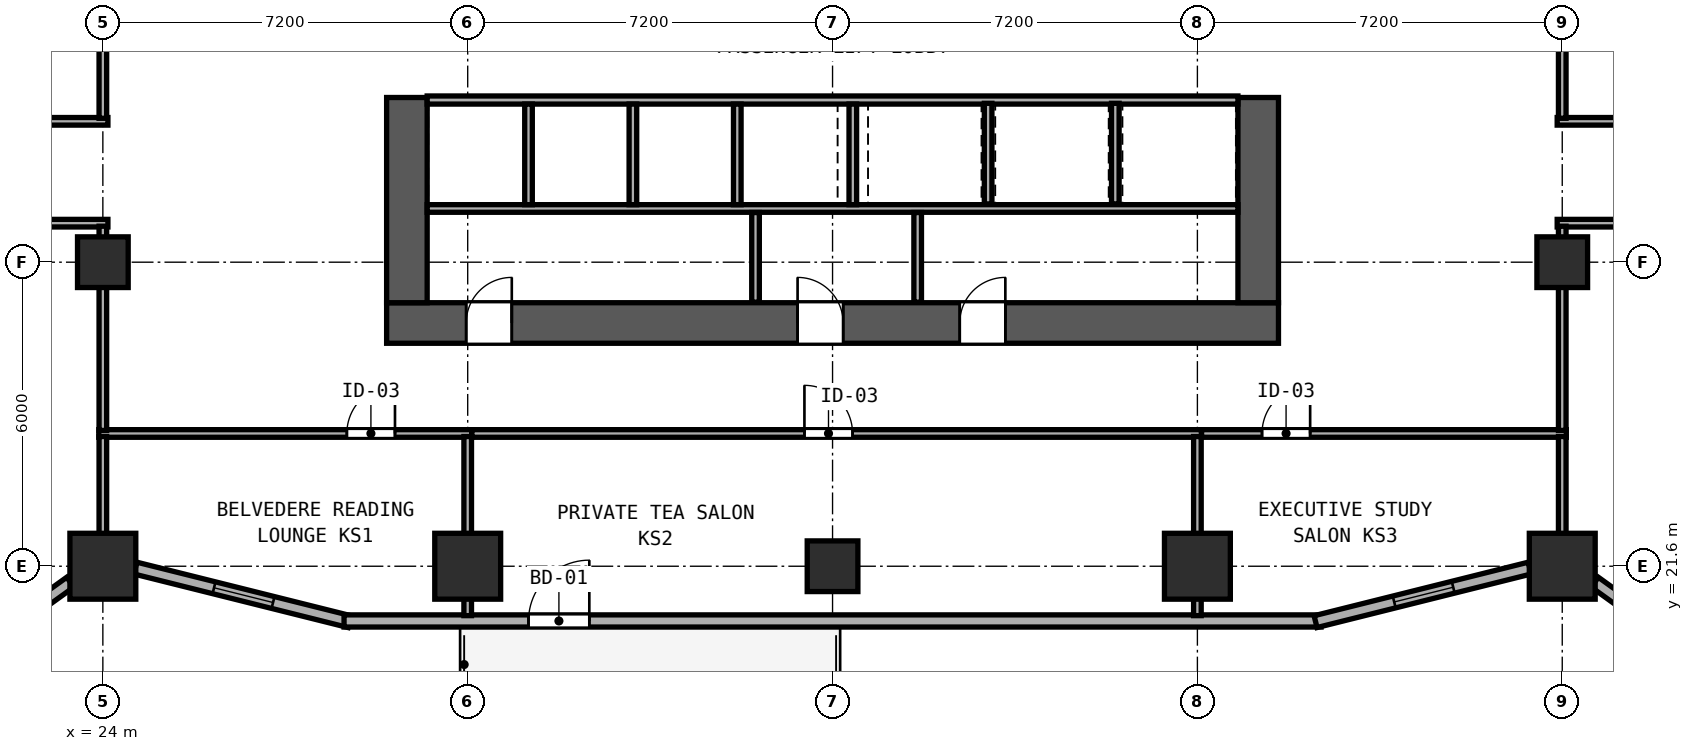
"""IFC4 building model, lengths in metres.
Left out: names, types, materials, properties, quantities, classifications, styles, units other than length and angle.
Written with IfcOpenShell. Run it as: python <this file> out.ifc"""

import sys

from ifc_helpers import new_model, si_unit, direction, frame, frame_2d, origin, origin_2d, place, context, subcontext, project, spatial, rectangle, hollow_rectangle, extrude, element, fill, save


model = new_model("IFC4")
c1 = context("Model", 3, precision=1e-05, world=origin(), true_north=direction((0.0, 1.0)))
c2 = subcontext(c1, "Body", "Model", "MODEL_VIEW")
j1 = project(units=[si_unit("LENGTHUNIT", "METRE"), si_unit("PLANEANGLEUNIT", "RADIAN")], contexts=[c1])
p1 = place(None, origin())
s1 = spatial("IfcSite", under=j1, at=p1, CompositionType="ELEMENT")
p2 = place(p1, origin())
s2 = spatial("IfcBuilding", under=s1, at=p2, CompositionType="ELEMENT")
p3 = place(p2, frame((0.0, 0.0, 31.6)))
s3 = spatial("IfcBuildingStorey", under=s2, at=p3, CompositionType="ELEMENT", Elevation=31.6)
p4 = place(p3, frame((29.6, 26.4, 0.0), z_axis=(0.0, 0.0, 1.0), x_axis=(1.0, 0.0, 0.0)))
e1 = element("IfcWall", 1, at=p4, inside=s3, PredefinedType="SHEAR", context=c2, shape_type="SweptSolid", body=[
    extrude(rectangle(XDim=17.6, YDim=0.8, at=frame_2d((8.8, 0.0))), origin(), (0.0, 0.0, 1.0), 3.6),
])
p5 = place(p4, frame((2.47, 0.0, 0.0), z_axis=(0.0, 0.0, 1.0), x_axis=(-1.0, 0.0, 0.0)))
e2 = element("IfcOpeningElement", 2, at=p5, cuts=e1, PredefinedType="OPENING", context=c2, shape_type="SweptSolid", body=[
    extrude(rectangle(XDim=0.9, YDim=2.1, at=frame_2d((0.45, 1.05))), frame((0.0, 0.41, 0.0), z_axis=(0.0, -1.0, 0.0), x_axis=(1.0, 0.0, 0.0)), (0.0, 0.0, 1.0), 0.82),
])
p6 = place(p4, frame((9.01, 0.0, 0.0), z_axis=(0.0, 0.0, 1.0), x_axis=(-1.0, 0.0, 0.0)))
e3 = element("IfcOpeningElement", 3, at=p6, cuts=e1, PredefinedType="OPENING", context=c2, shape_type="SweptSolid", body=[
    extrude(rectangle(XDim=0.9, YDim=2.1, at=frame_2d((0.45, 1.05))), frame((0.0, 0.41, 0.0), z_axis=(0.0, -1.0, 0.0), x_axis=(1.0, 0.0, 0.0)), (0.0, 0.0, 1.0), 0.82),
])
p7 = place(p4, frame((12.21, 0.0, 0.0), z_axis=(0.0, 0.0, 1.0), x_axis=(-1.0, 0.0, 0.0)))
e4 = element("IfcOpeningElement", 4, at=p7, cuts=e1, PredefinedType="OPENING", context=c2, shape_type="SweptSolid", body=[
    extrude(rectangle(XDim=0.9, YDim=2.1, at=frame_2d((0.45, 1.05))), frame((0.0, 0.41, 0.0), z_axis=(0.0, -1.0, 0.0), x_axis=(1.0, 0.0, 0.0)), (0.0, 0.0, 1.0), 0.82),
])
for number, where, z_axis, x_axis in (
    (5, (30.0, 26.8, 0.0), (0.0, 0.0, 1.0), (0.0, 1.0, 0.0)),
    (6, (46.8, 26.8, 0.0), (0.0, 0.0, 1.0), (0.0, 1.0, 0.0)),
):
    element("IfcWall", number, at=place(p3, frame(where, z_axis=z_axis, x_axis=x_axis)), inside=s3, PredefinedType="SHEAR", context=c2, shape_type="SweptSolid", body=[
        extrude(rectangle(XDim=4.05, YDim=0.8, at=frame_2d((2.025, 0.0))), origin(), (0.0, 0.0, 1.0), 3.6),
    ])
for number, where, z_axis, x_axis in (
    (7, (24.0, 21.6, 0.0), (0.0, 0.0, 1.0), (1.0, 0.0, 0.0)),
    (8, (52.8, 21.6, 0.0), (0.0, 0.0, 1.0), (1.0, 0.0, 0.0)),
    (9, (31.2, 21.6, 0.0), (0.0, 0.0, 1.0), (1.0, 0.0, 0.0)),
    (10, (45.6, 21.6, 0.0), (0.0, 0.0, 1.0), (1.0, 0.0, 0.0)),
):
    element("IfcColumn", number, at=place(p3, frame(where, z_axis=z_axis, x_axis=x_axis)), inside=s3, PredefinedType="COLUMN", context=c2, shape_type="SweptSolid", body=[
        extrude(hollow_rectangle(XDim=1.3, YDim=1.3, WallThickness=0.048, at=origin_2d()), origin(), (0.0, 0.0, 1.0), 3.8),
    ])
for number, where, z_axis, x_axis in (
    (11, (24.0, 27.6, 0.0), (0.0, 0.0, 1.0), (1.0, 0.0, 0.0)),
    (12, (52.8, 27.6, 0.0), (0.0, 0.0, 1.0), (1.0, 0.0, 0.0)),
    (13, (38.4, 21.6, 0.0), (0.0, 0.0, 1.0), (1.0, 0.0, 0.0)),
):
    element("IfcColumn", number, at=place(p3, frame(where, z_axis=z_axis, x_axis=x_axis)), inside=s3, PredefinedType="COLUMN", context=c2, shape_type="SweptSolid", body=[
        extrude(hollow_rectangle(XDim=1.0, YDim=1.0, WallThickness=0.038, at=origin_2d()), origin(), (0.0, 0.0, 1.0), 3.8),
    ])
p8 = place(p3, frame((14.075, 14.602, 0.0), z_axis=(0.0, 0.0, 1.0), x_axis=(0.811535555989, 0.584303038984, 0.0)))
e14 = element("IfcWall", 14, at=p8, inside=s3, PredefinedType="SOLIDWALL", context=c2, shape_type="SweptSolid", body=[
    extrude(rectangle(XDim=11.438, YDim=0.24, at=frame_2d((5.719, 0.0))), origin(), (0.0, 0.0, 1.0), 3.097),
])
p9 = place(p8, frame((1.6, 0.0, 0.85)))
e15 = element("IfcOpeningElement", 15, at=p9, cuts=e14, PredefinedType="OPENING", context=c2, shape_type="SweptSolid", body=[
    extrude(rectangle(XDim=1.2, YDim=1.85, at=frame_2d((0.6, 0.925))), frame((0.0, 0.13, 0.0), z_axis=(0.0, -1.0, 0.0), x_axis=(1.0, 0.0, 0.0)), (0.0, 0.0, 1.0), 0.26),
])
p10 = place(p8, frame((7.0, 0.0, 0.85)))
e16 = element("IfcOpeningElement", 16, at=p10, cuts=e14, PredefinedType="OPENING", context=c2, shape_type="SweptSolid", body=[
    extrude(rectangle(XDim=1.2, YDim=1.85, at=frame_2d((0.6, 0.925))), frame((0.0, 0.13, 0.0), z_axis=(0.0, -1.0, 0.0), x_axis=(1.0, 0.0, 0.0)), (0.0, 0.0, 1.0), 0.26),
])
p11 = place(p3, frame((24.642, 21.563, 0.0), z_axis=(0.0, 0.0, 1.0), x_axis=(0.970135906278, -0.242561998982, 0.0)))
e17 = element("IfcWall", 17, at=p11, inside=s3, PredefinedType="SOLIDWALL", context=c2, shape_type="SweptSolid", body=[
    extrude(rectangle(XDim=4.356, YDim=0.24, at=frame_2d((2.178, 0.0))), origin(), (0.0, 0.0, 1.0), 3.097),
])
p12 = place(p11, frame((1.6, 0.0, 0.85)))
e18 = element("IfcOpeningElement", 18, at=p12, cuts=e17, PredefinedType="OPENING", context=c2, shape_type="SweptSolid", body=[
    extrude(rectangle(XDim=1.2, YDim=1.85, at=frame_2d((0.6, 0.925))), frame((0.0, 0.13, 0.0), z_axis=(0.0, -1.0, 0.0), x_axis=(1.0, 0.0, 0.0)), (0.0, 0.0, 1.0), 0.26),
])
p13 = place(p3, frame((28.76, 20.52, 0.0), z_axis=(0.0, 0.0, 1.0), x_axis=(1.0, 0.0, 0.0)))
e19 = element("IfcWall", 19, at=p13, inside=s3, PredefinedType="SOLIDWALL", context=c2, shape_type="SweptSolid", body=[
    extrude(rectangle(XDim=19.281, YDim=0.24, at=frame_2d((9.64, 0.0))), origin(), (0.0, 0.0, 1.0), 3.6),
])
p14 = place(p13, frame((4.84, 0.0, 0.0), z_axis=(0.0, 0.0, 1.0), x_axis=(-1.0, 0.0, 0.0)))
e20 = element("IfcOpeningElement", 20, at=p14, cuts=e19, PredefinedType="OPENING", context=c2, shape_type="SweptSolid", body=[
    extrude(rectangle(XDim=1.2, YDim=2.15, at=frame_2d((0.6, 1.075))), frame((0.0, 0.13, 0.0), z_axis=(0.0, -1.0, 0.0), x_axis=(1.0, 0.0, 0.0)), (0.0, 0.0, 1.0), 0.26),
])
p15 = place(p3, frame((47.932, 20.507, 0.0), z_axis=(0.0, 0.0, 1.0), x_axis=(0.970135906278, 0.242561998982, 0.0)))
e21 = element("IfcWall", 21, at=p15, inside=s3, PredefinedType="SOLIDWALL", context=c2, shape_type="SweptSolid", body=[
    extrude(rectangle(XDim=4.356, YDim=0.24, at=frame_2d((2.178, 0.0))), origin(), (0.0, 0.0, 1.0), 3.097),
])
p16 = place(p15, frame((1.6, 0.0, 0.85)))
e22 = element("IfcOpeningElement", 22, at=p16, cuts=e21, PredefinedType="OPENING", context=c2, shape_type="SweptSolid", body=[
    extrude(rectangle(XDim=1.2, YDim=1.85, at=frame_2d((0.6, 0.925))), frame((0.0, 0.13, 0.0), z_axis=(0.0, -1.0, 0.0), x_axis=(1.0, 0.0, 0.0)), (0.0, 0.0, 1.0), 0.26),
])
p17 = place(p3, frame((53.442, 21.286, 0.0), z_axis=(0.0, 0.0, 1.0), x_axis=(0.811542842993, -0.584292917967, 0.0)))
e23 = element("IfcWall", 23, at=p17, inside=s3, PredefinedType="SOLIDWALL", context=c2, shape_type="SweptSolid", body=[
    extrude(rectangle(XDim=11.438, YDim=0.24, at=frame_2d((5.719, 0.0))), origin(), (0.0, 0.0, 1.0), 3.097),
])
p18 = place(p17, frame((1.6, 0.0, 0.85)))
e24 = element("IfcOpeningElement", 24, at=p18, cuts=e23, PredefinedType="OPENING", context=c2, shape_type="SweptSolid", body=[
    extrude(rectangle(XDim=1.2, YDim=1.85, at=frame_2d((0.6, 0.925))), frame((0.0, 0.13, 0.0), z_axis=(0.0, -1.0, 0.0), x_axis=(1.0, 0.0, 0.0)), (0.0, 0.0, 1.0), 0.26),
])
p19 = place(p17, frame((7.489, 0.0, 0.85)))
e25 = element("IfcOpeningElement", 25, at=p19, cuts=e23, PredefinedType="OPENING", context=c2, shape_type="SweptSolid", body=[
    extrude(rectangle(XDim=1.2, YDim=1.85, at=frame_2d((0.6, 0.925))), frame((0.0, 0.13, 0.0), z_axis=(0.0, -1.0, 0.0), x_axis=(1.0, 0.0, 0.0)), (0.0, 0.0, 1.0), 0.26),
])
p20 = place(p3, frame((30.4, 30.8, 0.0), z_axis=(0.0, 0.0, 1.0), x_axis=(1.0, 0.0, 0.0)))
e26 = element("IfcWall", 26, at=p20, inside=s3, PredefinedType="SOLIDWALL", context=c2, shape_type="SweptSolid", body=[
    extrude(rectangle(XDim=16.0, YDim=0.16, at=frame_2d((8.0, 0.0))), origin(), (0.0, 0.0, 1.0), 3.6),
])
p21 = place(p3, frame((30.4, 28.66, 0.0), z_axis=(0.0, 0.0, 1.0), x_axis=(1.0, 0.0, 0.0)))
e27 = element("IfcWall", 27, at=p21, inside=s3, PredefinedType="PARTITIONING", context=c2, shape_type="SweptSolid", body=[
    extrude(rectangle(XDim=16.0, YDim=0.15, at=frame_2d((8.0, 0.0))), origin(), (0.0, 0.0, 1.0), 3.6),
])
for number, where, z_axis, x_axis in (
    (28, (32.4, 28.735, 0.0), (0.0, 0.0, 1.0), (0.0, 1.0, 0.0)),
    (29, (34.46, 28.735, 0.0), (0.0, 0.0, 1.0), (0.0, 1.0, 0.0)),
    (30, (36.52, 28.735, 0.0), (0.0, 0.0, 1.0), (0.0, 1.0, 0.0)),
    (31, (38.8, 28.735, 0.0), (0.0, 0.0, 1.0), (0.0, 1.0, 0.0)),
):
    element("IfcWall", number, at=place(p3, frame(where, z_axis=z_axis, x_axis=x_axis)), inside=s3, PredefinedType="SOLIDWALL", context=c2, shape_type="SweptSolid", body=[
        extrude(rectangle(XDim=1.985, YDim=0.15, at=frame_2d((0.992, 0.0))), origin(), (0.0, 0.0, 1.0), 3.6),
    ])
for number, where, z_axis, x_axis in (
    (32, (36.88, 26.81, 0.0), (0.0, 0.0, 1.0), (0.0, 1.0, 0.0)),
    (33, (40.08, 26.81, 0.0), (0.0, 0.0, 1.0), (0.0, 1.0, 0.0)),
):
    element("IfcWall", number, at=place(p3, frame(where, z_axis=z_axis, x_axis=x_axis)), inside=s3, PredefinedType="PARTITIONING", context=c2, shape_type="SweptSolid", body=[
        extrude(rectangle(XDim=1.77, YDim=0.15, at=frame_2d((0.885, 0.0))), origin(), (0.0, 0.0, 1.0), 3.6),
    ])
for number, where, z_axis, x_axis in (
    (34, (41.47, 28.75, 0.0), (0.0, 0.0, 1.0), (0.0, 1.0, 0.0)),
    (35, (43.98, 28.75, 0.0), (0.0, 0.0, 1.0), (0.0, 1.0, 0.0)),
):
    element("IfcWall", number, at=place(p3, frame(where, z_axis=z_axis, x_axis=x_axis)), inside=s3, PredefinedType="SOLIDWALL", context=c2, shape_type="SweptSolid", body=[
        extrude(rectangle(XDim=1.985, YDim=0.15, at=frame_2d((0.993, 0.0))), origin(), (0.0, 0.0, 1.0), 3.6),
    ])
p22 = place(p3, frame((23.92, 24.22, 0.0), z_axis=(0.0, 0.0, 1.0), x_axis=(1.0, 0.0, 0.0)))
e36 = element("IfcWall", 36, at=p22, inside=s3, PredefinedType="PARTITIONING", context=c2, shape_type="SweptSolid", body=[
    extrude(rectangle(XDim=7.36, YDim=0.15, at=frame_2d((3.68, 0.0))), origin(), (0.0, 0.0, 1.0), 3.6),
])
p23 = place(p22, frame((5.845, 0.0, 0.0), z_axis=(0.0, 0.0, 1.0), x_axis=(-1.0, 0.0, 0.0)))
e37 = element("IfcOpeningElement", 37, at=p23, cuts=e36, PredefinedType="OPENING", context=c2, shape_type="SweptSolid", body=[
    extrude(rectangle(XDim=0.95, YDim=2.12, at=frame_2d((0.475, 1.06))), frame((0.0, 0.085, 0.0), z_axis=(0.0, -1.0, 0.0), x_axis=(1.0, 0.0, 0.0)), (0.0, 0.0, 1.0), 0.17),
])
p24 = place(p3, frame((24.0, 21.819, 0.0), z_axis=(0.0, 0.0, 1.0), x_axis=(0.0, 1.0, 0.0)))
e38 = element("IfcWall", 38, at=p24, inside=s3, PredefinedType="PARTITIONING", context=c2, shape_type="SweptSolid", body=[
    extrude(rectangle(XDim=2.341, YDim=0.15, at=frame_2d((1.171, 0.0))), origin(), (0.0, 0.0, 1.0), 3.097),
])
p25 = place(p3, frame((31.2, 20.625, 0.0), z_axis=(0.0, 0.0, 1.0), x_axis=(0.0, 1.0, 0.0)))
e39 = element("IfcWall", 39, at=p25, inside=s3, PredefinedType="PARTITIONING", context=c2, shape_type="SweptSolid", body=[
    extrude(rectangle(XDim=3.535, YDim=0.15, at=frame_2d((1.768, 0.0))), origin(), (0.0, 0.0, 1.0), 2.985),
])
p26 = place(p3, frame((31.282, 24.22, 0.0), z_axis=(0.0, 0.0, 1.0), x_axis=(1.0, 0.0, 0.0)))
e40 = element("IfcWall", 40, at=p26, inside=s3, PredefinedType="PARTITIONING", context=c2, shape_type="SweptSolid", body=[
    extrude(rectangle(XDim=14.398, YDim=0.15, at=frame_2d((7.199, 0.0))), origin(), (0.0, 0.0, 1.0), 3.6),
])
p27 = place(p26, frame((7.513, 0.0, 0.0), z_axis=(0.0, 0.0, 1.0), x_axis=(-1.0, 0.0, 0.0)))
e41 = element("IfcOpeningElement", 41, at=p27, cuts=e40, PredefinedType="OPENING", context=c2, shape_type="SweptSolid", body=[
    extrude(rectangle(XDim=0.95, YDim=2.12, at=frame_2d((0.475, 1.06))), frame((0.0, 0.085, 0.0), z_axis=(0.0, -1.0, 0.0), x_axis=(1.0, 0.0, 0.0)), (0.0, 0.0, 1.0), 0.17),
])
p28 = place(p3, frame((45.6, 20.625, 0.0), z_axis=(0.0, 0.0, 1.0), x_axis=(0.0, 1.0, 0.0)))
e42 = element("IfcWall", 42, at=p28, inside=s3, PredefinedType="PARTITIONING", context=c2, shape_type="SweptSolid", body=[
    extrude(rectangle(XDim=3.535, YDim=0.15, at=frame_2d((1.768, 0.0))), origin(), (0.0, 0.0, 1.0), 2.985),
])
p29 = place(p3, frame((45.682, 24.22, 0.0), z_axis=(0.0, 0.0, 1.0), x_axis=(1.0, 0.0, 0.0)))
e43 = element("IfcWall", 43, at=p29, inside=s3, PredefinedType="PARTITIONING", context=c2, shape_type="SweptSolid", body=[
    extrude(rectangle(XDim=7.198, YDim=0.15, at=frame_2d((3.599, 0.0))), origin(), (0.0, 0.0, 1.0), 3.6),
])
p30 = place(p29, frame((2.143, 0.0, 0.0), z_axis=(0.0, 0.0, 1.0), x_axis=(-1.0, 0.0, 0.0)))
e44 = element("IfcOpeningElement", 44, at=p30, cuts=e43, PredefinedType="OPENING", context=c2, shape_type="SweptSolid", body=[
    extrude(rectangle(XDim=0.95, YDim=2.12, at=frame_2d((0.475, 1.06))), frame((0.0, 0.085, 0.0), z_axis=(0.0, -1.0, 0.0), x_axis=(1.0, 0.0, 0.0)), (0.0, 0.0, 1.0), 0.17),
])
p31 = place(p3, frame((52.8, 21.819, 0.0), z_axis=(0.0, 0.0, 1.0), x_axis=(0.0, 1.0, 0.0)))
e45 = element("IfcWall", 45, at=p31, inside=s3, PredefinedType="PARTITIONING", context=c2, shape_type="SweptSolid", body=[
    extrude(rectangle(XDim=2.341, YDim=0.15, at=frame_2d((1.171, 0.0))), origin(), (0.0, 0.0, 1.0), 3.097),
])
p32 = place(p3, frame((19.952, 30.38, 0.0), z_axis=(0.0, 0.0, 1.0), x_axis=(1.0, 0.0, 0.0)))
e46 = element("IfcWall", 46, at=p32, inside=s3, PredefinedType="PARTITIONING", context=c2, shape_type="SweptSolid", body=[
    extrude(rectangle(XDim=4.148, YDim=0.15, at=frame_2d((2.074, 0.0))), origin(), (0.0, 0.0, 1.0), 3.6),
])
p33 = place(p32, frame((0.14, 0.0, 0.0)))
e47 = element("IfcOpeningElement", 47, at=p33, cuts=e46, PredefinedType="OPENING", context=c2, shape_type="SweptSolid", body=[
    extrude(rectangle(XDim=0.95, YDim=2.15, at=frame_2d((0.475, 1.075))), frame((0.0, 0.085, 0.0), z_axis=(0.0, -1.0, 0.0), x_axis=(1.0, 0.0, 0.0)), (0.0, 0.0, 1.0), 0.17),
])
p34 = place(p3, frame((24.0, 30.44, 0.0), z_axis=(0.0, 0.0, 1.0), x_axis=(0.0, 1.0, 0.0)))
e48 = element("IfcWall", 48, at=p34, inside=s3, PredefinedType="PARTITIONING", context=c2, shape_type="SweptSolid", body=[
    extrude(rectangle(XDim=2.5, YDim=0.15, at=frame_2d((1.25, 0.0))), origin(), (0.0, 0.0, 1.0), 3.097),
])
p35 = place(p3, frame((17.512, 28.37, 0.0), z_axis=(0.0, 0.0, 1.0), x_axis=(1.0, 0.0, 0.0)))
e49 = element("IfcWall", 49, at=p35, inside=s3, PredefinedType="PARTITIONING", context=c2, shape_type="SweptSolid", body=[
    extrude(rectangle(XDim=6.588, YDim=0.15, at=frame_2d((3.294, 0.0))), origin(), (0.0, 0.0, 1.0), 3.6),
])
p36 = place(p35, frame((1.09, 0.0, 0.0), z_axis=(0.0, 0.0, 1.0), x_axis=(-1.0, 0.0, 0.0)))
e50 = element("IfcOpeningElement", 50, at=p36, cuts=e49, PredefinedType="OPENING", context=c2, shape_type="SweptSolid", body=[
    extrude(rectangle(XDim=0.95, YDim=2.18, at=frame_2d((0.475, 1.09))), frame((0.0, 0.085, 0.0), z_axis=(0.0, -1.0, 0.0), x_axis=(1.0, 0.0, 0.0)), (0.0, 0.0, 1.0), 0.17),
])
p37 = place(p3, frame((24.0, 24.28, 0.0), z_axis=(0.0, 0.0, 1.0), x_axis=(0.0, 1.0, 0.0)))
e51 = element("IfcWall", 51, at=p37, inside=s3, PredefinedType="PARTITIONING", context=c2, shape_type="SweptSolid", body=[
    extrude(rectangle(XDim=4.03, YDim=0.15, at=frame_2d((2.015, 0.0))), origin(), (0.0, 0.0, 1.0), 3.097),
])
p38 = place(p3, frame((52.7, 30.38, 0.0), z_axis=(0.0, 0.0, 1.0), x_axis=(1.0, 0.0, 0.0)))
e52 = element("IfcWall", 52, at=p38, inside=s3, PredefinedType="PARTITIONING", context=c2, shape_type="SweptSolid", body=[
    extrude(rectangle(XDim=7.76, YDim=0.15, at=frame_2d((3.88, 0.0))), origin(), (0.0, 0.0, 1.0), 3.6),
])
p39 = place(p38, frame((3.294, 0.0, 0.0)))
e53 = element("IfcOpeningElement", 53, at=p39, cuts=e52, PredefinedType="OPENING", context=c2, shape_type="SweptSolid", body=[
    extrude(rectangle(XDim=0.95, YDim=2.18, at=frame_2d((0.475, 1.09))), frame((0.0, 0.085, 0.0), z_axis=(0.0, -1.0, 0.0), x_axis=(1.0, 0.0, 0.0)), (0.0, 0.0, 1.0), 0.17),
])
p40 = place(p3, frame((52.8, 30.44, 0.0), z_axis=(0.0, 0.0, 1.0), x_axis=(0.0, 1.0, 0.0)))
e54 = element("IfcWall", 54, at=p40, inside=s3, PredefinedType="PARTITIONING", context=c2, shape_type="SweptSolid", body=[
    extrude(rectangle(XDim=2.5, YDim=0.15, at=frame_2d((1.25, 0.0))), origin(), (0.0, 0.0, 1.0), 3.097),
])
p41 = place(p3, frame((52.7, 28.37, 0.0), z_axis=(0.0, 0.0, 1.0), x_axis=(1.0, 0.0, 0.0)))
e55 = element("IfcWall", 55, at=p41, inside=s3, PredefinedType="PARTITIONING", context=c2, shape_type="SweptSolid", body=[
    extrude(rectangle(XDim=6.79, YDim=0.15, at=frame_2d((3.395, 0.0))), origin(), (0.0, 0.0, 1.0), 3.6),
])
p42 = place(p41, frame((5.24, 0.0, 0.0), z_axis=(0.0, 0.0, 1.0), x_axis=(-1.0, 0.0, 0.0)))
e56 = element("IfcOpeningElement", 56, at=p42, cuts=e55, PredefinedType="OPENING", context=c2, shape_type="SweptSolid", body=[
    extrude(rectangle(XDim=0.95, YDim=2.18, at=frame_2d((0.475, 1.09))), frame((0.0, 0.085, 0.0), z_axis=(0.0, -1.0, 0.0), x_axis=(1.0, 0.0, 0.0)), (0.0, 0.0, 1.0), 0.17),
])
p43 = place(p3, frame((52.8, 24.28, 0.0), z_axis=(0.0, 0.0, 1.0), x_axis=(0.0, 1.0, 0.0)))
e57 = element("IfcWall", 57, at=p43, inside=s3, PredefinedType="PARTITIONING", context=c2, shape_type="SweptSolid", body=[
    extrude(rectangle(XDim=4.03, YDim=0.15, at=frame_2d((2.015, 0.0))), origin(), (0.0, 0.0, 1.0), 3.097),
])
p44 = place(p12, origin())
e58 = element("IfcWindow", 58, at=p44, inside=s3, PartitioningType="SINGLE_PANEL", PredefinedType="WINDOW", context=c2, shape_type="SweptSolid", body=[
    extrude(rectangle(XDim=1.2, YDim=1.85, at=frame_2d((0.6, 0.925))), frame((0.0, 0.03, 0.0), z_axis=(0.0, -1.0, 0.0), x_axis=(1.0, 0.0, 0.0)), (0.0, 0.0, 1.0), 0.06),
])
fill(e18, e58)
p45 = place(p16, origin())
e59 = element("IfcWindow", 59, at=p45, inside=s3, PartitioningType="SINGLE_PANEL", PredefinedType="WINDOW", context=c2, shape_type="SweptSolid", body=[
    extrude(rectangle(XDim=1.2, YDim=1.85, at=frame_2d((0.6, 0.925))), frame((0.0, 0.03, 0.0), z_axis=(0.0, -1.0, 0.0), x_axis=(1.0, 0.0, 0.0)), (0.0, 0.0, 1.0), 0.06),
])
fill(e22, e59)
p46 = place(p14, origin())
e60 = element("IfcDoor", 60, at=p46, inside=s3, OperationType="SINGLE_SWING_LEFT", PredefinedType="DOOR", context=c2, shape_type="SweptSolid", body=[
    extrude(rectangle(XDim=1.2, YDim=2.15, at=frame_2d((0.6, 1.075))), frame((0.0, 0.025, 0.0), z_axis=(0.0, -1.0, 0.0), x_axis=(1.0, 0.0, 0.0)), (0.0, 0.0, 1.0), 0.05),
])
fill(e20, e60)
p47 = place(p5, origin())
e61 = element("IfcDoor", 61, at=p47, inside=s3, OperationType="SINGLE_SWING_LEFT", PredefinedType="DOOR", context=c2, shape_type="SweptSolid", body=[
    extrude(rectangle(XDim=0.9, YDim=2.1, at=frame_2d((0.45, 1.05))), frame((0.0, -0.195, 0.0), z_axis=(0.0, -1.0, 0.0), x_axis=(1.0, 0.0, 0.0)), (0.0, 0.0, 1.0), 0.05),
])
fill(e2, e61)
p48 = place(p6, origin())
e62 = element("IfcDoor", 62, at=p48, inside=s3, OperationType="SINGLE_SWING_RIGHT", PredefinedType="DOOR", context=c2, shape_type="SweptSolid", body=[
    extrude(rectangle(XDim=0.9, YDim=2.1, at=frame_2d((0.45, 1.05))), frame((0.0, -0.195, 0.0), z_axis=(0.0, -1.0, 0.0), x_axis=(1.0, 0.0, 0.0)), (0.0, 0.0, 1.0), 0.05),
])
fill(e3, e62)
p49 = place(p7, origin())
e63 = element("IfcDoor", 63, at=p49, inside=s3, OperationType="SINGLE_SWING_LEFT", PredefinedType="DOOR", context=c2, shape_type="SweptSolid", body=[
    extrude(rectangle(XDim=0.9, YDim=2.1, at=frame_2d((0.45, 1.05))), frame((0.0, -0.195, 0.0), z_axis=(0.0, -1.0, 0.0), x_axis=(1.0, 0.0, 0.0)), (0.0, 0.0, 1.0), 0.05),
])
fill(e4, e63)
p50 = place(p23, origin())
e64 = element("IfcDoor", 64, at=p50, inside=s3, OperationType="SINGLE_SWING_LEFT", PredefinedType="DOOR", context=c2, shape_type="SweptSolid", body=[
    extrude(rectangle(XDim=0.95, YDim=2.12, at=frame_2d((0.475, 1.06))), frame((0.0, 0.025, 0.0), z_axis=(0.0, -1.0, 0.0), x_axis=(1.0, 0.0, 0.0)), (0.0, 0.0, 1.0), 0.05),
])
fill(e37, e64)
p51 = place(p27, origin())
e65 = element("IfcDoor", 65, at=p51, inside=s3, OperationType="SINGLE_SWING_RIGHT", PredefinedType="DOOR", context=c2, shape_type="SweptSolid", body=[
    extrude(rectangle(XDim=0.95, YDim=2.12, at=frame_2d((0.475, 1.06))), frame((0.0, 0.025, 0.0), z_axis=(0.0, -1.0, 0.0), x_axis=(1.0, 0.0, 0.0)), (0.0, 0.0, 1.0), 0.05),
])
fill(e41, e65)
p52 = place(p30, origin())
e66 = element("IfcDoor", 66, at=p52, inside=s3, OperationType="SINGLE_SWING_LEFT", PredefinedType="DOOR", context=c2, shape_type="SweptSolid", body=[
    extrude(rectangle(XDim=0.95, YDim=2.12, at=frame_2d((0.475, 1.06))), frame((0.0, 0.025, 0.0), z_axis=(0.0, -1.0, 0.0), x_axis=(1.0, 0.0, 0.0)), (0.0, 0.0, 1.0), 0.05),
])
fill(e44, e66)
save(model, sys.argv[1])
